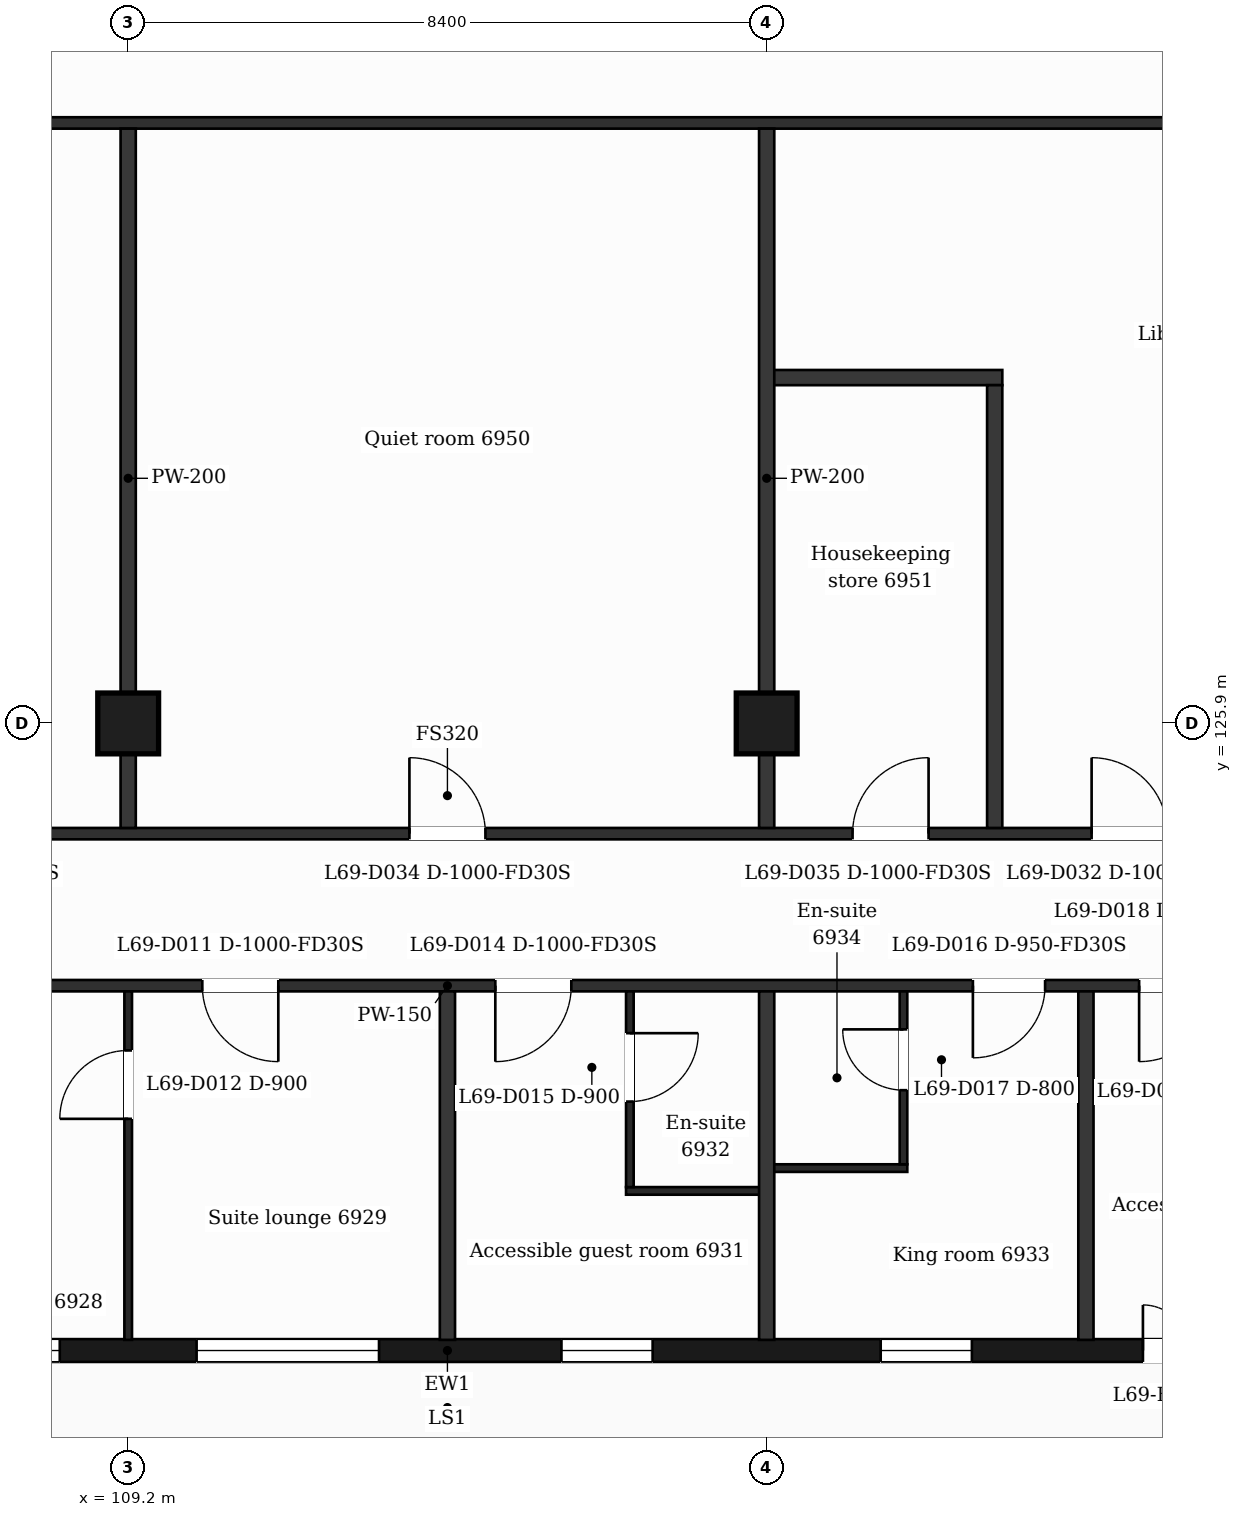
"""IFC4 building model, lengths in metres.
Left out: names, types, materials, properties, quantities, classifications, styles, units other than length and angle.
Written with IfcOpenShell. Run it as: python <this file> out.ifc"""

import sys

from ifc_helpers import new_model, si_unit, direction, frame, frame_2d, origin, origin_2d, place, context, subcontext, project, spatial, rectangle, extrude, element, fill, save


model = new_model("IFC4")
c1 = context("Model", 3, precision=1e-05, world=origin(), true_north=direction((0.0, 1.0)))
c2 = subcontext(c1, "Body", "Model", "MODEL_VIEW")
j1 = project(units=[si_unit("LENGTHUNIT", "METRE"), si_unit("PLANEANGLEUNIT", "RADIAN")], contexts=[c1])
p1 = place(None, origin())
s1 = spatial("IfcSite", under=j1, at=p1, CompositionType="ELEMENT")
p2 = place(p1, origin())
s2 = spatial("IfcBuilding", under=s1, at=p2, CompositionType="ELEMENT")
p3 = place(p2, frame((0.0, 0.0, 284.9)))
s3 = spatial("IfcBuildingStorey", under=s2, at=p3, CompositionType="ELEMENT", Elevation=284.9)
for number, where, z_axis, x_axis in (
    (1, (109.2, 125.9, 0.0), (0.0, 0.0, 1.0), (1.0, 0.0, 0.0)),
    (2, (117.6, 125.9, 0.0), (0.0, 0.0, 1.0), (1.0, 0.0, 0.0)),
):
    element("IfcColumn", number, at=place(p3, frame(where, z_axis=z_axis, x_axis=x_axis)), inside=s3, PredefinedType="COLUMN", context=c2, shape_type="SweptSolid", body=[
        extrude(rectangle(XDim=0.8, YDim=0.8, at=origin_2d()), origin(), (0.0, 0.0, 1.0), 3.7),
    ])
p4 = place(p3, frame((100.8, 117.65, 0.0), z_axis=(0.0, 0.0, 1.0), x_axis=(1.0, 0.0, 0.0)))
e3 = element("IfcWall", 3, at=p4, inside=s3, PredefinedType="SOLIDWALL", context=c2, shape_type="SweptSolid", body=[
    extrude(rectangle(XDim=25.2, YDim=0.3, at=frame_2d((12.6, 0.0))), origin(), (0.0, 0.0, 1.0), 3.38),
])
p5 = place(p4, frame((0.95, 0.0, 0.9)))
e4 = element("IfcOpeningElement", 4, at=p5, cuts=e3, PredefinedType="OPENING", context=c2, shape_type="SweptSolid", body=[
    extrude(rectangle(XDim=2.4, YDim=2.1, at=frame_2d((1.2, 1.05))), frame((0.0, 0.16, 0.0), z_axis=(0.0, -1.0, 0.0), x_axis=(1.0, 0.0, 0.0)), (0.0, 0.0, 1.0), 0.32),
])
p6 = place(p4, frame((5.1, 0.0, 0.9)))
e5 = element("IfcOpeningElement", 5, at=p6, cuts=e3, PredefinedType="OPENING", context=c2, shape_type="SweptSolid", body=[
    extrude(rectangle(XDim=2.4, YDim=2.1, at=frame_2d((1.2, 1.05))), frame((0.0, 0.16, 0.0), z_axis=(0.0, -1.0, 0.0), x_axis=(1.0, 0.0, 0.0)), (0.0, 0.0, 1.0), 0.32),
])
p7 = place(p4, frame((9.3, 0.0, 0.9)))
e6 = element("IfcOpeningElement", 6, at=p7, cuts=e3, PredefinedType="OPENING", context=c2, shape_type="SweptSolid", body=[
    extrude(rectangle(XDim=2.4, YDim=2.1, at=frame_2d((1.2, 1.05))), frame((0.0, 0.16, 0.0), z_axis=(0.0, -1.0, 0.0), x_axis=(1.0, 0.0, 0.0)), (0.0, 0.0, 1.0), 0.32),
])
p8 = place(p4, frame((14.1, 0.0, 0.9)))
e7 = element("IfcOpeningElement", 7, at=p8, cuts=e3, PredefinedType="OPENING", context=c2, shape_type="SweptSolid", body=[
    extrude(rectangle(XDim=1.2, YDim=2.1, at=frame_2d((0.6, 1.05))), frame((0.0, 0.16, 0.0), z_axis=(0.0, -1.0, 0.0), x_axis=(1.0, 0.0, 0.0)), (0.0, 0.0, 1.0), 0.32),
])
p9 = place(p4, frame((18.3, 0.0, 0.9)))
e8 = element("IfcOpeningElement", 8, at=p9, cuts=e3, PredefinedType="OPENING", context=c2, shape_type="SweptSolid", body=[
    extrude(rectangle(XDim=1.2, YDim=2.1, at=frame_2d((0.6, 1.05))), frame((0.0, 0.16, 0.0), z_axis=(0.0, -1.0, 0.0), x_axis=(1.0, 0.0, 0.0)), (0.0, 0.0, 1.0), 0.32),
])
p10 = place(p4, frame((21.75, 0.0, 0.0)))
e9 = element("IfcOpeningElement", 9, at=p10, cuts=e3, PredefinedType="OPENING", context=c2, shape_type="SweptSolid", body=[
    extrude(rectangle(XDim=1.2, YDim=2.4, at=frame_2d((0.6, 1.2))), frame((0.0, 0.16, 0.0), z_axis=(0.0, -1.0, 0.0), x_axis=(1.0, 0.0, 0.0)), (0.0, 0.0, 1.0), 0.32),
])
p11 = place(p4, frame((23.55, 0.0, 0.9)))
e10 = element("IfcOpeningElement", 10, at=p11, cuts=e3, PredefinedType="OPENING", context=c2, shape_type="SweptSolid", body=[
    extrude(rectangle(XDim=1.2, YDim=2.1, at=frame_2d((0.6, 1.05))), frame((0.0, 0.16, 0.0), z_axis=(0.0, -1.0, 0.0), x_axis=(1.0, 0.0, 0.0)), (0.0, 0.0, 1.0), 0.32),
])
p12 = place(p3, frame((115.75, 119.75, 0.0), z_axis=(0.0, 0.0, 1.0), x_axis=(1.0, 0.0, 0.0)))
e11 = element("IfcWall", 11, at=p12, inside=s3, PredefinedType="PARTITIONING", context=c2, shape_type="SweptSolid", body=[
    extrude(rectangle(XDim=1.85, YDim=0.1, at=frame_2d((0.925, 0.0))), origin(), (0.0, 0.0, 1.0), 3.38),
])
p13 = place(p3, frame((117.6, 120.05, 0.0), z_axis=(0.0, 0.0, 1.0), x_axis=(1.0, 0.0, 0.0)))
e12 = element("IfcWall", 12, at=p13, inside=s3, PredefinedType="PARTITIONING", context=c2, shape_type="SweptSolid", body=[
    extrude(rectangle(XDim=1.85, YDim=0.1, at=frame_2d((0.925, 0.0))), origin(), (0.0, 0.0, 1.0), 3.38),
])
p14 = place(p3, frame((100.8, 122.45, 0.0), z_axis=(0.0, 0.0, 1.0), x_axis=(1.0, 0.0, 0.0)))
e13 = element("IfcWall", 13, at=p14, inside=s3, PredefinedType="PARTITIONING", context=c2, shape_type="SweptSolid", body=[
    extrude(rectangle(XDim=25.2, YDim=0.15, at=frame_2d((12.6, 0.0))), origin(), (0.0, 0.0, 1.0), 3.38),
])
p15 = place(p14, frame((0.55, 0.0, 0.0)))
e14 = element("IfcOpeningElement", 14, at=p15, cuts=e13, PredefinedType="OPENING", context=c2, shape_type="SweptSolid", body=[
    extrude(rectangle(XDim=1.0, YDim=2.1, at=frame_2d((0.5, 1.05))), frame((0.0, 0.085, 0.0), z_axis=(0.0, -1.0, 0.0), x_axis=(1.0, 0.0, 0.0)), (0.0, 0.0, 1.0), 0.17),
])
p16 = place(p14, frame((9.375, 0.0, 0.0)))
e15 = element("IfcOpeningElement", 15, at=p16, cuts=e13, PredefinedType="OPENING", context=c2, shape_type="SweptSolid", body=[
    extrude(rectangle(XDim=1.0, YDim=2.1, at=frame_2d((0.5, 1.05))), frame((0.0, 0.085, 0.0), z_axis=(0.0, -1.0, 0.0), x_axis=(1.0, 0.0, 0.0)), (0.0, 0.0, 1.0), 0.17),
])
p17 = place(p14, frame((13.23, 0.0, 0.0)))
e16 = element("IfcOpeningElement", 16, at=p17, cuts=e13, PredefinedType="OPENING", context=c2, shape_type="SweptSolid", body=[
    extrude(rectangle(XDim=1.0, YDim=2.1, at=frame_2d((0.5, 1.05))), frame((0.0, 0.085, 0.0), z_axis=(0.0, -1.0, 0.0), x_axis=(1.0, 0.0, 0.0)), (0.0, 0.0, 1.0), 0.17),
])
p18 = place(p14, frame((19.513, 0.0, 0.0)))
e17 = element("IfcOpeningElement", 17, at=p18, cuts=e13, PredefinedType="OPENING", context=c2, shape_type="SweptSolid", body=[
    extrude(rectangle(XDim=0.95, YDim=2.1, at=frame_2d((0.475, 1.05))), frame((0.0, 0.085, 0.0), z_axis=(0.0, -1.0, 0.0), x_axis=(1.0, 0.0, 0.0)), (0.0, 0.0, 1.0), 0.17),
])
p19 = place(p14, frame((21.7, 0.0, 0.0)))
e18 = element("IfcOpeningElement", 18, at=p19, cuts=e13, PredefinedType="OPENING", context=c2, shape_type="SweptSolid", body=[
    extrude(rectangle(XDim=1.0, YDim=2.1, at=frame_2d((0.5, 1.05))), frame((0.0, 0.085, 0.0), z_axis=(0.0, -1.0, 0.0), x_axis=(1.0, 0.0, 0.0)), (0.0, 0.0, 1.0), 0.17),
])
p20 = place(p3, frame((100.8, 124.45, 0.0), z_axis=(0.0, 0.0, 1.0), x_axis=(1.0, 0.0, 0.0)))
e19 = element("IfcWall", 19, at=p20, inside=s3, PredefinedType="PARTITIONING", context=c2, shape_type="SweptSolid", body=[
    extrude(rectangle(XDim=25.2, YDim=0.15, at=frame_2d((12.6, 0.0))), origin(), (0.0, 0.0, 1.0), 3.38),
])
p21 = place(p20, frame((21.075, 0.0, 0.0)))
e20 = element("IfcOpeningElement", 20, at=p21, cuts=e19, PredefinedType="OPENING", context=c2, shape_type="SweptSolid", body=[
    extrude(rectangle(XDim=1.0, YDim=2.1, at=frame_2d((0.5, 1.05))), frame((0.0, 0.085, 0.0), z_axis=(0.0, -1.0, 0.0), x_axis=(1.0, 0.0, 0.0)), (0.0, 0.0, 1.0), 0.17),
])
p22 = place(p20, frame((5.375, 0.0, 0.0)))
e21 = element("IfcOpeningElement", 21, at=p22, cuts=e19, PredefinedType="OPENING", context=c2, shape_type="SweptSolid", body=[
    extrude(rectangle(XDim=1.0, YDim=2.1, at=frame_2d((0.5, 1.05))), frame((0.0, 0.085, 0.0), z_axis=(0.0, -1.0, 0.0), x_axis=(1.0, 0.0, 0.0)), (0.0, 0.0, 1.0), 0.17),
])
p23 = place(p20, frame((12.1, 0.0, 0.0)))
e22 = element("IfcOpeningElement", 22, at=p23, cuts=e19, PredefinedType="OPENING", context=c2, shape_type="SweptSolid", body=[
    extrude(rectangle(XDim=1.0, YDim=2.1, at=frame_2d((0.5, 1.05))), frame((0.0, 0.085, 0.0), z_axis=(0.0, -1.0, 0.0), x_axis=(1.0, 0.0, 0.0)), (0.0, 0.0, 1.0), 0.17),
])
p24 = place(p20, frame((17.93, 0.0, 0.0)))
e23 = element("IfcOpeningElement", 23, at=p24, cuts=e19, PredefinedType="OPENING", context=c2, shape_type="SweptSolid", body=[
    extrude(rectangle(XDim=1.0, YDim=2.1, at=frame_2d((0.5, 1.05))), frame((0.0, 0.085, 0.0), z_axis=(0.0, -1.0, 0.0), x_axis=(1.0, 0.0, 0.0)), (0.0, 0.0, 1.0), 0.17),
])
p25 = place(p3, frame((117.6, 130.45, 0.0), z_axis=(0.0, 0.0, 1.0), x_axis=(1.0, 0.0, 0.0)))
e24 = element("IfcWall", 24, at=p25, inside=s3, PredefinedType="PARTITIONING", context=c2, shape_type="SweptSolid", body=[
    extrude(rectangle(XDim=3.1, YDim=0.2, at=frame_2d((1.55, 0.0))), origin(), (0.0, 0.0, 1.0), 3.38),
])
p26 = place(p3, frame((100.725, 133.8, 0.0), z_axis=(0.0, 0.0, 1.0), x_axis=(1.0, 0.0, 0.0)))
e25 = element("IfcWall", 25, at=p26, inside=s3, PredefinedType="PARTITIONING", context=c2, shape_type="SweptSolid", body=[
    extrude(rectangle(XDim=25.35, YDim=0.15, at=frame_2d((12.675, 0.0))), origin(), (0.0, 0.0, 1.0), 3.38),
])
p27 = place(p3, frame((109.2, 117.79, 0.0), z_axis=(0.0, 0.0, 1.0), x_axis=(0.0, 1.0, 0.0)))
e26 = element("IfcWall", 26, at=p27, inside=s3, PredefinedType="PARTITIONING", context=c2, shape_type="SweptSolid", body=[
    extrude(rectangle(XDim=4.585, YDim=0.1, at=frame_2d((2.292, 0.0))), origin(), (0.0, 0.0, 1.0), 3.38),
])
p28 = place(p27, frame((2.908, 0.0, 0.0)))
e27 = element("IfcOpeningElement", 27, at=p28, cuts=e26, PredefinedType="OPENING", context=c2, shape_type="SweptSolid", body=[
    extrude(rectangle(XDim=0.9, YDim=2.1, at=frame_2d((0.45, 1.05))), frame((0.0, 0.06, 0.0), z_axis=(0.0, -1.0, 0.0), x_axis=(1.0, 0.0, 0.0)), (0.0, 0.0, 1.0), 0.12),
])
p29 = place(p3, frame((109.2, 124.525, 0.0), z_axis=(0.0, 0.0, 1.0), x_axis=(0.0, 1.0, 0.0)))
e28 = element("IfcWall", 28, at=p29, inside=s3, PredefinedType="PARTITIONING", context=c2, shape_type="SweptSolid", body=[
    extrude(rectangle(XDim=9.2, YDim=0.2, at=frame_2d((4.6, 0.0))), origin(), (0.0, 0.0, 1.0), 3.38),
])
p30 = place(p3, frame((113.4, 117.79, 0.0), z_axis=(0.0, 0.0, 1.0), x_axis=(0.0, 1.0, 0.0)))
e29 = element("IfcWall", 29, at=p30, inside=s3, PredefinedType="PARTITIONING", context=c2, shape_type="SweptSolid", body=[
    extrude(rectangle(XDim=4.585, YDim=0.2, at=frame_2d((2.292, 0.0))), origin(), (0.0, 0.0, 1.0), 3.38),
])
p31 = place(p3, frame((115.8, 119.8, 0.0), z_axis=(0.0, 0.0, 1.0), x_axis=(0.0, 1.0, 0.0)))
e30 = element("IfcWall", 30, at=p31, inside=s3, PredefinedType="PARTITIONING", context=c2, shape_type="SweptSolid", body=[
    extrude(rectangle(XDim=2.575, YDim=0.1, at=frame_2d((1.288, 0.0))), origin(), (0.0, 0.0, 1.0), 3.38),
])
p32 = place(p31, frame((1.125, 0.0, 0.0)))
e31 = element("IfcOpeningElement", 31, at=p32, cuts=e30, PredefinedType="OPENING", context=c2, shape_type="SweptSolid", body=[
    extrude(rectangle(XDim=0.9, YDim=2.1, at=frame_2d((0.45, 1.05))), frame((0.0, 0.06, 0.0), z_axis=(0.0, -1.0, 0.0), x_axis=(1.0, 0.0, 0.0)), (0.0, 0.0, 1.0), 0.12),
])
p33 = place(p3, frame((117.6, 117.79, 0.0), z_axis=(0.0, 0.0, 1.0), x_axis=(0.0, 1.0, 0.0)))
e32 = element("IfcWall", 32, at=p33, inside=s3, PredefinedType="PARTITIONING", context=c2, shape_type="SweptSolid", body=[
    extrude(rectangle(XDim=4.585, YDim=0.2, at=frame_2d((2.292, 0.0))), origin(), (0.0, 0.0, 1.0), 3.38),
])
p34 = place(p3, frame((117.6, 124.525, 0.0), z_axis=(0.0, 0.0, 1.0), x_axis=(0.0, 1.0, 0.0)))
e33 = element("IfcWall", 33, at=p34, inside=s3, PredefinedType="PARTITIONING", context=c2, shape_type="SweptSolid", body=[
    extrude(rectangle(XDim=9.2, YDim=0.2, at=frame_2d((4.6, 0.0))), origin(), (0.0, 0.0, 1.0), 3.38),
])
p35 = place(p3, frame((119.4, 120.1, 0.0), z_axis=(0.0, 0.0, 1.0), x_axis=(0.0, 1.0, 0.0)))
e34 = element("IfcWall", 34, at=p35, inside=s3, PredefinedType="PARTITIONING", context=c2, shape_type="SweptSolid", body=[
    extrude(rectangle(XDim=2.275, YDim=0.1, at=frame_2d((1.137, 0.0))), origin(), (0.0, 0.0, 1.0), 3.38),
])
p36 = place(p35, frame((0.975, 0.0, 0.0)))
e35 = element("IfcOpeningElement", 35, at=p36, cuts=e34, PredefinedType="OPENING", context=c2, shape_type="SweptSolid", body=[
    extrude(rectangle(XDim=0.8, YDim=2.1, at=frame_2d((0.4, 1.05))), frame((0.0, 0.06, 0.0), z_axis=(0.0, -1.0, 0.0), x_axis=(1.0, 0.0, 0.0)), (0.0, 0.0, 1.0), 0.12),
])
p37 = place(p3, frame((120.6, 124.525, 0.0), z_axis=(0.0, 0.0, 1.0), x_axis=(0.0, 1.0, 0.0)))
e36 = element("IfcWall", 36, at=p37, inside=s3, PredefinedType="PARTITIONING", context=c2, shape_type="SweptSolid", body=[
    extrude(rectangle(XDim=5.825, YDim=0.2, at=frame_2d((2.913, 0.0))), origin(), (0.0, 0.0, 1.0), 3.38),
])
p38 = place(p3, frame((121.8, 117.79, 0.0), z_axis=(0.0, 0.0, 1.0), x_axis=(0.0, 1.0, 0.0)))
e37 = element("IfcWall", 37, at=p38, inside=s3, PredefinedType="PARTITIONING", context=c2, shape_type="SweptSolid", body=[
    extrude(rectangle(XDim=4.585, YDim=0.2, at=frame_2d((2.292, 0.0))), origin(), (0.0, 0.0, 1.0), 3.38),
])
p39 = place(p6, origin())
e38 = element("IfcWindow", 38, at=p39, inside=s3, PartitioningType="SINGLE_PANEL", PredefinedType="WINDOW", context=c2, shape_type="SweptSolid", body=[
    extrude(rectangle(XDim=2.4, YDim=2.1, at=frame_2d((1.2, 1.05))), frame((0.0, 0.03, 0.0), z_axis=(0.0, -1.0, 0.0), x_axis=(1.0, 0.0, 0.0)), (0.0, 0.0, 1.0), 0.06),
])
fill(e5, e38)
p40 = place(p7, origin())
e39 = element("IfcWindow", 39, at=p40, inside=s3, PartitioningType="SINGLE_PANEL", PredefinedType="WINDOW", context=c2, shape_type="SweptSolid", body=[
    extrude(rectangle(XDim=2.4, YDim=2.1, at=frame_2d((1.2, 1.05))), frame((0.0, 0.03, 0.0), z_axis=(0.0, -1.0, 0.0), x_axis=(1.0, 0.0, 0.0)), (0.0, 0.0, 1.0), 0.06),
])
fill(e6, e39)
p41 = place(p8, origin())
e40 = element("IfcWindow", 40, at=p41, inside=s3, PartitioningType="SINGLE_PANEL", PredefinedType="WINDOW", context=c2, shape_type="SweptSolid", body=[
    extrude(rectangle(XDim=1.2, YDim=2.1, at=frame_2d((0.6, 1.05))), frame((0.0, 0.03, 0.0), z_axis=(0.0, -1.0, 0.0), x_axis=(1.0, 0.0, 0.0)), (0.0, 0.0, 1.0), 0.06),
])
fill(e7, e40)
p42 = place(p9, origin())
e41 = element("IfcWindow", 41, at=p42, inside=s3, PartitioningType="SINGLE_PANEL", PredefinedType="WINDOW", context=c2, shape_type="SweptSolid", body=[
    extrude(rectangle(XDim=1.2, YDim=2.1, at=frame_2d((0.6, 1.05))), frame((0.0, 0.03, 0.0), z_axis=(0.0, -1.0, 0.0), x_axis=(1.0, 0.0, 0.0)), (0.0, 0.0, 1.0), 0.06),
])
fill(e8, e41)
p43 = place(p10, origin())
e42 = element("IfcDoor", 42, at=p43, inside=s3, OperationType="DOUBLE_DOOR_SINGLE_SWING", PredefinedType="DOOR", context=c2, shape_type="SweptSolid", body=[
    extrude(rectangle(XDim=1.2, YDim=2.4, at=frame_2d((0.6, 1.2))), frame((0.0, 0.025, 0.0), z_axis=(0.0, -1.0, 0.0), x_axis=(1.0, 0.0, 0.0)), (0.0, 0.0, 1.0), 0.05),
])
fill(e9, e42)
p44 = place(p16, origin())
e43 = element("IfcDoor", 43, at=p44, inside=s3, OperationType="SINGLE_SWING_RIGHT", PredefinedType="DOOR", context=c2, shape_type="SweptSolid", body=[
    extrude(rectangle(XDim=1.0, YDim=2.1, at=frame_2d((0.5, 1.05))), frame((0.0, 0.025, 0.0), z_axis=(0.0, -1.0, 0.0), x_axis=(1.0, 0.0, 0.0)), (0.0, 0.0, 1.0), 0.05),
])
fill(e15, e43)
p45 = place(p28, origin())
e44 = element("IfcDoor", 44, at=p45, inside=s3, OperationType="SINGLE_SWING_LEFT", PredefinedType="DOOR", context=c2, shape_type="SweptSolid", body=[
    extrude(rectangle(XDim=0.9, YDim=2.1, at=frame_2d((0.45, 1.05))), frame((0.0, 0.025, 0.0), z_axis=(0.0, -1.0, 0.0), x_axis=(1.0, 0.0, 0.0)), (0.0, 0.0, 1.0), 0.05),
])
fill(e27, e44)
p46 = place(p17, origin())
e45 = element("IfcDoor", 45, at=p46, inside=s3, OperationType="SINGLE_SWING_LEFT", PredefinedType="DOOR", context=c2, shape_type="SweptSolid", body=[
    extrude(rectangle(XDim=1.0, YDim=2.1, at=frame_2d((0.5, 1.05))), frame((0.0, 0.025, 0.0), z_axis=(0.0, -1.0, 0.0), x_axis=(1.0, 0.0, 0.0)), (0.0, 0.0, 1.0), 0.05),
])
fill(e16, e45)
p47 = place(p32, origin())
e46 = element("IfcDoor", 46, at=p47, inside=s3, OperationType="SINGLE_SWING_RIGHT", PredefinedType="DOOR", context=c2, shape_type="SweptSolid", body=[
    extrude(rectangle(XDim=0.9, YDim=2.1, at=frame_2d((0.45, 1.05))), frame((0.0, 0.025, 0.0), z_axis=(0.0, -1.0, 0.0), x_axis=(1.0, 0.0, 0.0)), (0.0, 0.0, 1.0), 0.05),
])
fill(e31, e46)
p48 = place(p18, origin())
e47 = element("IfcDoor", 47, at=p48, inside=s3, OperationType="SINGLE_SWING_LEFT", PredefinedType="DOOR", context=c2, shape_type="SweptSolid", body=[
    extrude(rectangle(XDim=0.95, YDim=2.1, at=frame_2d((0.475, 1.05))), frame((0.0, 0.025, 0.0), z_axis=(0.0, -1.0, 0.0), x_axis=(1.0, 0.0, 0.0)), (0.0, 0.0, 1.0), 0.05),
])
fill(e17, e47)
p49 = place(p36, origin())
e48 = element("IfcDoor", 48, at=p49, inside=s3, OperationType="SINGLE_SWING_RIGHT", PredefinedType="DOOR", context=c2, shape_type="SweptSolid", body=[
    extrude(rectangle(XDim=0.8, YDim=2.1, at=frame_2d((0.4, 1.05))), frame((0.0, 0.025, 0.0), z_axis=(0.0, -1.0, 0.0), x_axis=(1.0, 0.0, 0.0)), (0.0, 0.0, 1.0), 0.05),
])
fill(e35, e48)
p50 = place(p19, origin())
e49 = element("IfcDoor", 49, at=p50, inside=s3, OperationType="SINGLE_SWING_LEFT", PredefinedType="DOOR", context=c2, shape_type="SweptSolid", body=[
    extrude(rectangle(XDim=1.0, YDim=2.1, at=frame_2d((0.5, 1.05))), frame((0.0, 0.025, 0.0), z_axis=(0.0, -1.0, 0.0), x_axis=(1.0, 0.0, 0.0)), (0.0, 0.0, 1.0), 0.05),
])
fill(e18, e49)
p51 = place(p21, origin())
e50 = element("IfcDoor", 50, at=p51, inside=s3, OperationType="SINGLE_SWING_LEFT", PredefinedType="DOOR", context=c2, shape_type="SweptSolid", body=[
    extrude(rectangle(XDim=1.0, YDim=2.1, at=frame_2d((0.5, 1.05))), frame((0.0, 0.025, 0.0), z_axis=(0.0, -1.0, 0.0), x_axis=(1.0, 0.0, 0.0)), (0.0, 0.0, 1.0), 0.05),
])
fill(e20, e50)
p52 = place(p23, origin())
e51 = element("IfcDoor", 51, at=p52, inside=s3, OperationType="SINGLE_SWING_LEFT", PredefinedType="DOOR", context=c2, shape_type="SweptSolid", body=[
    extrude(rectangle(XDim=1.0, YDim=2.1, at=frame_2d((0.5, 1.05))), frame((0.0, 0.025, 0.0), z_axis=(0.0, -1.0, 0.0), x_axis=(1.0, 0.0, 0.0)), (0.0, 0.0, 1.0), 0.05),
])
fill(e22, e51)
p53 = place(p24, origin())
e52 = element("IfcDoor", 52, at=p53, inside=s3, OperationType="SINGLE_SWING_RIGHT", PredefinedType="DOOR", context=c2, shape_type="SweptSolid", body=[
    extrude(rectangle(XDim=1.0, YDim=2.1, at=frame_2d((0.5, 1.05))), frame((0.0, 0.025, 0.0), z_axis=(0.0, -1.0, 0.0), x_axis=(1.0, 0.0, 0.0)), (0.0, 0.0, 1.0), 0.05),
])
fill(e23, e52)
save(model, sys.argv[1])
